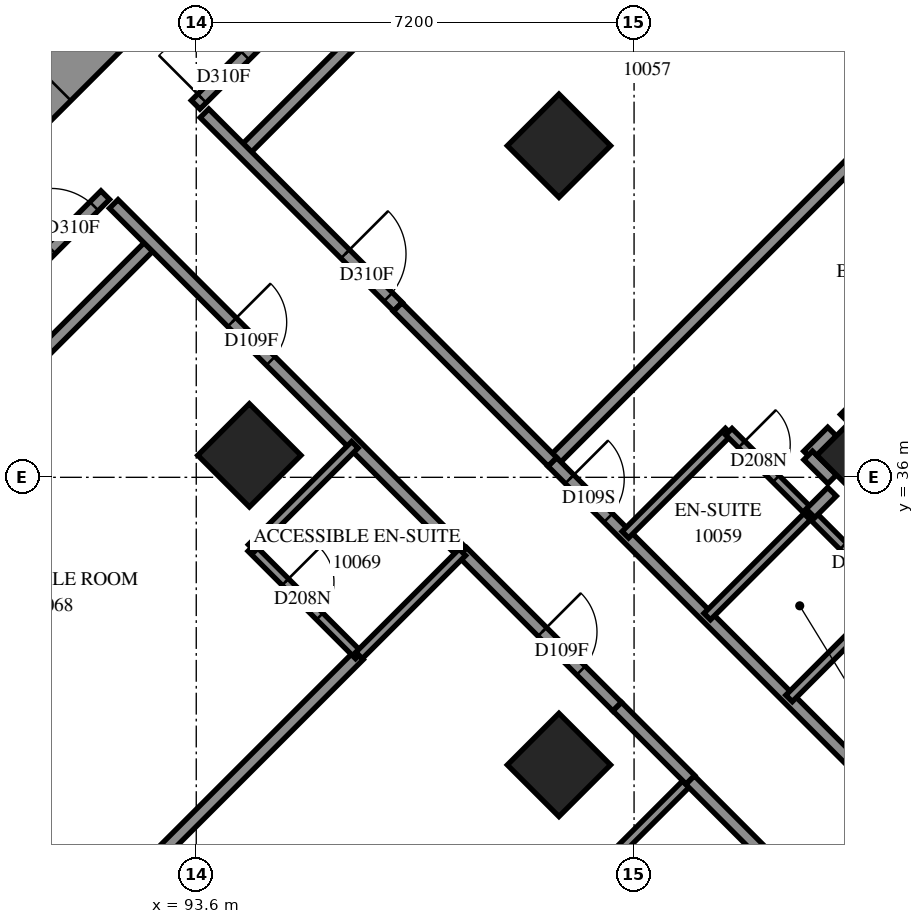
"""IFC4 building model, lengths in metres.
Left out: names, types, materials, properties, quantities, classifications, styles, units other than length and angle.
Written with IfcOpenShell. Run it as: python <this file> out.ifc"""

import sys

from ifc_helpers import new_model, si_unit, direction, frame, frame_2d, origin, origin_2d, place, context, subcontext, project, spatial, polyline, rectangle, outline, extrude, element, fill, save


model = new_model("IFC4")
c1 = context("Model", 3, precision=1e-05, world=origin(), true_north=direction((0.0, 1.0)))
c2 = subcontext(c1, "Body", "Model", "MODEL_VIEW")
j1 = project(units=[si_unit("LENGTHUNIT", "METRE"), si_unit("PLANEANGLEUNIT", "RADIAN")], contexts=[c1])
p1 = place(None, origin())
s1 = spatial("IfcSite", under=j1, at=p1, CompositionType="ELEMENT")
p2 = place(p1, origin())
s2 = spatial("IfcBuilding", under=s1, at=p2, CompositionType="ELEMENT")
p3 = place(p2, frame((0.0, 0.0, 40.6)))
s3 = spatial("IfcBuildingStorey", under=s2, at=p3, CompositionType="ELEMENT", Elevation=40.6)
for number, where, z_axis, x_axis in (
    (1, (99.565, 41.453, 0.0), (0.0, 0.0, 1.0), (0.707, -0.707, 0.0)),
    (2, (94.474, 36.362, 0.0), (0.0, 0.0, 1.0), (0.707, -0.707, 0.0)),
    (3, (104.656, 36.362, 0.0), (0.0, 0.0, 1.0), (0.707, -0.707, 0.0)),
    (4, (99.565, 31.271, 0.0), (0.0, 0.0, 1.0), (0.707, -0.707, 0.0)),
):
    element("IfcColumn", number, at=place(p3, frame(where, z_axis=z_axis, x_axis=x_axis)), inside=s3, PredefinedType="COLUMN", context=c2, shape_type="SweptSolid", body=[
        extrude(rectangle(XDim=1.2, YDim=1.2, at=origin_2d()), origin(), (0.0, 0.0, 1.0), 3.1),
    ])
p4 = place(p3, frame((87.19, 38.554, -0.3), z_axis=(0.0, 0.0, 1.0), x_axis=(0.707103309, 0.7071102534, 0.0)))
e5 = element("IfcWall", 5, at=p4, inside=s3, PredefinedType="SHEAR", context=c2, shape_type="SweptSolid", body=[
    extrude(rectangle(XDim=14.4, YDim=1.0, at=frame_2d((7.2, 0.0))), origin(), (0.0, 0.0, 1.0), 2.7),
])
p5 = place(p4, frame((4.55, 0.0, 0.3)))
e6 = element("IfcOpeningElement", 6, at=p5, cuts=e5, PredefinedType="OPENING", context=c2, shape_type="SweptSolid", body=[
    extrude(rectangle(XDim=1.1, YDim=2.1, at=frame_2d((0.55, 1.05))), frame((0.0, 0.51, 0.0), z_axis=(0.0, -1.0, 0.0), x_axis=(1.0, 0.0, 0.0)), (0.0, 0.0, 1.0), 1.02),
])
p6 = place(p4, frame((11.35, 0.0, 0.3)))
e7 = element("IfcOpeningElement", 7, at=p6, cuts=e5, PredefinedType="OPENING", context=c2, shape_type="SweptSolid", body=[
    extrude(rectangle(XDim=1.1, YDim=2.1, at=frame_2d((0.55, 1.05))), frame((0.0, 0.51, 0.0), z_axis=(0.0, -1.0, 0.0), x_axis=(1.0, 0.0, 0.0)), (0.0, 0.0, 1.0), 1.02),
])
p7 = place(p3, frame((88.113, 30.639, 0.0), z_axis=(0.0, 0.0, 1.0), x_axis=(0.7793447186, -0.6265954114, 0.0)))
e8 = element("IfcWall", 8, at=p7, inside=s3, PredefinedType="SOLIDWALL", context=c2, shape_type="SweptSolid", body=[
    extrude(outline(polyline([(-0.03, -0.275), (3.868, -0.275), (3.928, 0.275), (0.03, 0.275), (-0.03, -0.275)])), origin(), (0.0, 0.0, 1.0), 3.1),
])
p8 = place(p7, frame((0.675, 0.0, 0.5)))
e9 = element("IfcOpeningElement", 9, at=p8, cuts=e8, PredefinedType="OPENING", context=c2, shape_type="SweptSolid", body=[
    extrude(rectangle(XDim=2.8, YDim=2.45, at=frame_2d((1.4, 1.225))), frame((0.0, 0.285, 0.0), z_axis=(0.0, -1.0, 0.0), x_axis=(1.0, 0.0, 0.0)), (0.0, 0.0, 1.0), 0.57),
])
p9 = place(p3, frame((99.459, 36.255, 0.0), z_axis=(0.0, 0.0, 1.0), x_axis=(0.7071905616, 0.7070229908, 0.0)))
e10 = element("IfcWall", 10, at=p9, inside=s3, PredefinedType="PARTITIONING", context=c2, shape_type="SweptSolid", body=[
    extrude(rectangle(XDim=11.935, YDim=0.2, at=frame_2d((5.968, 0.0))), origin(), (0.0, 0.0, 1.0), 3.1),
])
p10 = place(p3, frame((94.367, 41.349, 0.0), z_axis=(0.0, 0.0, 1.0), x_axis=(0.7071109856, 0.7071025768, 0.0)))
e11 = element("IfcWall", 11, at=p10, inside=s3, PredefinedType="PARTITIONING", context=c2, shape_type="SweptSolid", body=[
    extrude(rectangle(XDim=11.892, YDim=0.2, at=frame_2d((5.946, 0.0))), origin(), (0.0, 0.0, 1.0), 3.1),
])
p11 = place(p3, frame((93.59, 42.126, 0.0), z_axis=(0.0, 0.0, 1.0), x_axis=(0.7071067812, 0.7071067812, 0.0)))
e12 = element("IfcWall", 12, at=p11, inside=s3, PredefinedType="PARTITIONING", context=c2, shape_type="SweptSolid", body=[
    extrude(rectangle(XDim=9.849, YDim=0.2, at=frame_2d((4.924, 0.0))), origin(), (0.0, 0.0, 1.0), 3.1),
])
p12 = place(p11, frame((0.148, 0.0, 0.0)))
e13 = element("IfcOpeningElement", 13, at=p12, cuts=e12, PredefinedType="OPENING", context=c2, shape_type="SweptSolid", body=[
    extrude(rectangle(XDim=1.0, YDim=2.1, at=frame_2d((0.5, 1.05))), frame((0.0, 0.11, 0.0), z_axis=(0.0, -1.0, 0.0), x_axis=(1.0, 0.0, 0.0)), (0.0, 0.0, 1.0), 0.22),
])
p13 = place(p3, frame((86.327, 33.299, 0.0), z_axis=(0.0, 0.0, 1.0), x_axis=(0.7069989659, 0.7072145801, 0.0)))
e14 = element("IfcWall", 14, at=p13, inside=s3, PredefinedType="PARTITIONING", context=c2, shape_type="SweptSolid", body=[
    extrude(rectangle(XDim=9.276, YDim=0.2, at=frame_2d((4.638, 0.0))), origin(), (0.0, 0.0, 1.0), 3.1),
])
p14 = place(p3, frame((92.243, 40.495, 0.0), z_axis=(0.0, 0.0, 1.0), x_axis=(0.7071067812, -0.7071067812, 0.0)))
e15 = element("IfcWall", 15, at=p14, inside=s3, PredefinedType="PARTITIONING", context=c2, shape_type="SweptSolid", body=[
    extrude(rectangle(XDim=8.101, YDim=0.2, at=frame_2d((4.05, 0.0))), origin(), (0.0, 0.0, 1.0), 3.1),
])
p15 = place(p14, frame((2.75, 0.0, 0.0)))
e16 = element("IfcOpeningElement", 16, at=p15, cuts=e15, PredefinedType="OPENING", context=c2, shape_type="SweptSolid", body=[
    extrude(rectangle(XDim=0.9, YDim=2.1, at=frame_2d((0.45, 1.05))), frame((0.0, 0.11, 0.0), z_axis=(0.0, -1.0, 0.0), x_axis=(1.0, 0.0, 0.0)), (0.0, 0.0, 1.0), 0.22),
])
p16 = place(p3, frame((86.836, 35.372, 0.0), z_axis=(0.0, 0.0, 1.0), x_axis=(0.7071067812, 0.7071067812, 0.0)))
e17 = element("IfcWall", 17, at=p16, inside=s3, PredefinedType="PARTITIONING", context=c2, shape_type="SweptSolid", body=[
    extrude(rectangle(XDim=7.45, YDim=0.2, at=frame_2d((3.725, 0.0))), origin(), (0.0, 0.0, 1.0), 3.1),
])
p17 = place(p16, frame((6.192, 0.0, 0.0)))
e18 = element("IfcOpeningElement", 18, at=p17, cuts=e17, PredefinedType="OPENING", context=c2, shape_type="SweptSolid", body=[
    extrude(rectangle(XDim=1.0, YDim=2.1, at=frame_2d((0.5, 1.05))), frame((0.0, 0.11, 0.0), z_axis=(0.0, -1.0, 0.0), x_axis=(1.0, 0.0, 0.0)), (0.0, 0.0, 1.0), 0.22),
])
p18 = place(p3, frame((99.455, 36.253, 0.0), z_axis=(0.0, 0.0, 1.0), x_axis=(0.7071067812, -0.7071067812, 0.0)))
e19 = element("IfcWall", 19, at=p18, inside=s3, PredefinedType="PARTITIONING", context=c2, shape_type="SweptSolid", body=[
    extrude(rectangle(XDim=7.201, YDim=0.2, at=frame_2d((3.601, 0.0))), origin(), (0.0, 0.0, 1.0), 3.1),
])
p19 = place(p18, frame((0.401, 0.0, 0.0)))
e20 = element("IfcOpeningElement", 20, at=p19, cuts=e19, PredefinedType="OPENING", context=c2, shape_type="SweptSolid", body=[
    extrude(rectangle(XDim=0.9, YDim=2.1, at=frame_2d((0.45, 1.05))), frame((0.0, 0.11, 0.0), z_axis=(0.0, -1.0, 0.0), x_axis=(1.0, 0.0, 0.0)), (0.0, 0.0, 1.0), 0.22),
])
p20 = place(p3, frame((91.456, 28.255, 0.0), z_axis=(0.0, 0.0, 1.0), x_axis=(0.7071067812, 0.7071067812, 0.0)))
e21 = element("IfcWall", 21, at=p20, inside=s3, PredefinedType="PARTITIONING", context=c2, shape_type="SweptSolid", body=[
    extrude(rectangle(XDim=6.815, YDim=0.2, at=frame_2d((3.408, 0.0))), origin(), (0.0, 0.0, 1.0), 3.1),
])
p21 = place(p3, frame((93.735, 41.987, 0.0), z_axis=(0.0, 0.0, 1.0), x_axis=(0.7071067812, -0.7071067812, 0.0)))
e22 = element("IfcWall", 22, at=p21, inside=s3, PredefinedType="PARTITIONING", context=c2, shape_type="SweptSolid", body=[
    extrude(rectangle(XDim=4.5, YDim=0.2, at=frame_2d((2.25, 0.0))), origin(), (0.0, 0.0, 1.0), 3.1),
])
p22 = place(p21, frame((3.274, 0.0, 0.0)))
e23 = element("IfcOpeningElement", 23, at=p22, cuts=e22, PredefinedType="OPENING", context=c2, shape_type="SweptSolid", body=[
    extrude(rectangle(XDim=1.0, YDim=2.1, at=frame_2d((0.5, 1.05))), frame((0.0, 0.11, 0.0), z_axis=(0.0, -1.0, 0.0), x_axis=(1.0, 0.0, 0.0)), (0.0, 0.0, 1.0), 0.22),
])
p23 = place(p3, frame((96.913, 38.801, 0.0), z_axis=(0.0, 0.0, 1.0), x_axis=(0.7068288851, -0.7073845681, 0.0)))
e24 = element("IfcWall", 24, at=p23, inside=s3, PredefinedType="PARTITIONING", context=c2, shape_type="SweptSolid", body=[
    extrude(rectangle(XDim=3.599, YDim=0.2, at=frame_2d((1.8, 0.0))), origin(), (0.0, 0.0, 1.0), 3.1),
])
p24 = place(p3, frame((97.976, 34.772, 0.0), z_axis=(0.0, 0.0, 1.0), x_axis=(0.7073845681, -0.7068288851, 0.0)))
e25 = element("IfcWall", 25, at=p24, inside=s3, PredefinedType="PARTITIONING", context=c2, shape_type="SweptSolid", body=[
    extrude(rectangle(XDim=3.599, YDim=0.2, at=frame_2d((1.8, 0.0))), origin(), (0.0, 0.0, 1.0), 3.1),
])
p25 = place(p24, frame((1.858, 0.0, 0.0)))
e26 = element("IfcOpeningElement", 26, at=p25, cuts=e25, PredefinedType="OPENING", context=c2, shape_type="SweptSolid", body=[
    extrude(rectangle(XDim=0.9, YDim=2.1, at=frame_2d((0.45, 1.05))), frame((0.0, 0.11, 0.0), z_axis=(0.0, -1.0, 0.0), x_axis=(1.0, 0.0, 0.0)), (0.0, 0.0, 1.0), 0.22),
])
p26 = place(p3, frame((94.505, 34.839, 0.0), z_axis=(0.0, 0.0, 1.0), x_axis=(0.7071067812, -0.7071067812, 0.0)))
e27 = element("IfcWall", 27, at=p26, inside=s3, PredefinedType="PARTITIONING", context=c2, shape_type="SweptSolid", body=[
    extrude(rectangle(XDim=2.5, YDim=0.15, at=frame_2d((1.25, 0.0))), origin(), (0.0, 0.0, 1.0), 3.1),
])
p27 = place(p26, frame((0.792, 0.0, 0.0)))
e28 = element("IfcOpeningElement", 28, at=p27, cuts=e27, PredefinedType="OPENING", context=c2, shape_type="SweptSolid", body=[
    extrude(rectangle(XDim=0.8, YDim=2.1, at=frame_2d((0.4, 1.05))), frame((0.0, 0.085, 0.0), z_axis=(0.0, -1.0, 0.0), x_axis=(1.0, 0.0, 0.0)), (0.0, 0.0, 1.0), 0.17),
])
for number, where, z_axis, x_axis in (
    (29, (102.003, 33.711, 0.0), (0.0, 0.0, 1.0), (0.707, 0.707, 0.0)),
    (30, (100.023, 29.327, 0.0), (0.0, 0.0, 1.0), (0.707, 0.707, 0.0)),
):
    element("IfcWall", number, at=place(p3, frame(where, z_axis=z_axis, x_axis=x_axis)), inside=s3, PredefinedType="PARTITIONING", context=c2, shape_type="SweptSolid", body=[
        extrude(rectangle(XDim=2.401, YDim=0.15, at=frame_2d((1.201, 0.0))), origin(), (0.0, 0.0, 1.0), 3.1),
    ])
for number, where, z_axis, x_axis in (
    (31, (96.278, 33.072, 0.0), (0.0, 0.0, 1.0), (0.708, 0.707, 0.0)),
    (32, (94.511, 34.839, 0.0), (0.0, 0.0, 1.0), (0.708, 0.707, 0.0)),
    (33, (100.657, 35.057, 0.0), (0.0, 0.0, 1.0), (0.708, 0.707, 0.0)),
    (34, (103.349, 32.365, 0.0), (0.0, 0.0, 1.0), (0.707, 0.708, 0.0)),
):
    element("IfcWall", number, at=place(p3, frame(where, z_axis=z_axis, x_axis=x_axis)), inside=s3, PredefinedType="PARTITIONING", context=c2, shape_type="SweptSolid", body=[
        extrude(rectangle(XDim=2.4, YDim=0.15, at=frame_2d((1.2, 0.0))), origin(), (0.0, 0.0, 1.0), 3.1),
    ])
p28 = place(p3, frame((103.701, 35.407, 0.0), z_axis=(0.0, 0.0, 1.0), x_axis=(0.7065800724, -0.7076330979, 0.0)))
e35 = element("IfcWall", 35, at=p28, inside=s3, PredefinedType="PARTITIONING", context=c2, shape_type="SweptSolid", body=[
    extrude(rectangle(XDim=1.899, YDim=0.15, at=frame_2d((0.95, 0.0))), origin(), (0.0, 0.0, 1.0), 3.1),
])
p29 = place(p28, frame((0.759, 0.0, 0.0)))
e36 = element("IfcOpeningElement", 36, at=p29, cuts=e35, PredefinedType="OPENING", context=c2, shape_type="SweptSolid", body=[
    extrude(rectangle(XDim=0.8, YDim=2.1, at=frame_2d((0.4, 1.05))), frame((0.0, 0.085, 0.0), z_axis=(0.0, -1.0, 0.0), x_axis=(1.0, 0.0, 0.0)), (0.0, 0.0, 1.0), 0.17),
])
p30 = place(p3, frame((101.72, 31.022, 0.0), z_axis=(0.0, 0.0, 1.0), x_axis=(0.7065800724, -0.7076330979, 0.0)))
e37 = element("IfcWall", 37, at=p30, inside=s3, PredefinedType="PARTITIONING", context=c2, shape_type="SweptSolid", body=[
    extrude(rectangle(XDim=1.899, YDim=0.2, at=frame_2d((0.95, 0.0))), origin(), (0.0, 0.0, 1.0), 3.1),
])
p31 = place(p3, frame((102.358, 36.75, 0.0), z_axis=(0.0, 0.0, 1.0), x_axis=(0.7076330979, -0.7065800724, 0.0)))
e38 = element("IfcWall", 38, at=p31, inside=s3, PredefinedType="PARTITIONING", context=c2, shape_type="SweptSolid", body=[
    extrude(rectangle(XDim=1.899, YDim=0.15, at=frame_2d((0.95, 0.0))), origin(), (0.0, 0.0, 1.0), 3.1),
])
p32 = place(p31, frame((0.296, 0.0, 0.0)))
e39 = element("IfcOpeningElement", 39, at=p32, cuts=e38, PredefinedType="OPENING", context=c2, shape_type="SweptSolid", body=[
    extrude(rectangle(XDim=0.8, YDim=2.1, at=frame_2d((0.4, 1.05))), frame((0.0, 0.085, 0.0), z_axis=(0.0, -1.0, 0.0), x_axis=(1.0, 0.0, 0.0)), (0.0, 0.0, 1.0), 0.17),
])
p33 = place(p3, frame((100.523, 32.229, 0.0), z_axis=(0.0, 0.0, 1.0), x_axis=(0.7071067812, -0.7071067812, 0.0)))
e40 = element("IfcWall", 40, at=p33, inside=s3, PredefinedType="PARTITIONING", context=c2, shape_type="SweptSolid", body=[
    extrude(rectangle(XDim=1.7, YDim=0.2, at=frame_2d((0.85, 0.0))), origin(), (0.0, 0.0, 1.0), 3.1),
])
for number, where, z_axis, x_axis in (
    (41, (103.661, 36.359, 0.0), (0.0, 0.0, 1.0), (0.707, 0.707, 0.0)),
    (42, (104.265, 36.963, 0.0), (0.0, 0.0, 1.0), (0.707, 0.707, 0.0)),
):
    element("IfcWall", number, at=place(p3, frame(where, z_axis=z_axis, x_axis=x_axis)), inside=s3, PredefinedType="PARTITIONING", context=c2, shape_type="SweptSolid", body=[
        extrude(rectangle(XDim=0.557, YDim=0.2, at=frame_2d((0.279, 0.0))), origin(), (0.0, 0.0, 1.0), 3.1),
    ])
p34 = place(p3, frame((103.664, 36.36, 0.0), z_axis=(0.0, 0.0, 1.0), x_axis=(0.7089037401, -0.705305244, 0.0)))
e43 = element("IfcWall", 43, at=p34, inside=s3, PredefinedType="PARTITIONING", context=c2, shape_type="SweptSolid", body=[
    extrude(rectangle(XDim=0.556, YDim=0.2, at=frame_2d((0.278, 0.0))), origin(), (0.0, 0.0, 1.0), 3.1),
])
p35 = place(p3, frame((103.701, 35.409, 0.0), z_axis=(0.0, 0.0, 1.0), x_axis=(0.7071067812, 0.7071067812, 0.0)))
e44 = element("IfcWall", 44, at=p35, inside=s3, PredefinedType="PARTITIONING", context=c2, shape_type="SweptSolid", body=[
    extrude(rectangle(XDim=0.501, YDim=0.2, at=frame_2d((0.25, 0.0))), origin(), (0.0, 0.0, 1.0), 3.1),
])
p36 = place(p12, origin())
e45 = element("IfcDoor", 45, at=p36, inside=s3, OperationType="SINGLE_SWING_LEFT", PredefinedType="DOOR", context=c2, shape_type="SweptSolid", body=[
    extrude(rectangle(XDim=1.0, YDim=2.1, at=frame_2d((0.5, 1.05))), frame((0.0, 0.025, 0.0), z_axis=(0.0, -1.0, 0.0), x_axis=(1.0, 0.0, 0.0)), (0.0, 0.0, 1.0), 0.05),
])
fill(e13, e45)
p37 = place(p22, origin())
e46 = element("IfcDoor", 46, at=p37, inside=s3, OperationType="SINGLE_SWING_RIGHT", PredefinedType="DOOR", context=c2, shape_type="SweptSolid", body=[
    extrude(rectangle(XDim=1.0, YDim=2.1, at=frame_2d((0.5, 1.05))), frame((0.0, 0.025, 0.0), z_axis=(0.0, -1.0, 0.0), x_axis=(1.0, 0.0, 0.0)), (0.0, 0.0, 1.0), 0.05),
])
fill(e23, e46)
p38 = place(p19, origin())
e47 = element("IfcDoor", 47, at=p38, inside=s3, OperationType="SINGLE_SWING_RIGHT", PredefinedType="DOOR", context=c2, shape_type="SweptSolid", body=[
    extrude(rectangle(XDim=0.9, YDim=2.1, at=frame_2d((0.45, 1.05))), frame((0.0, 0.025, 0.0), z_axis=(0.0, -1.0, 0.0), x_axis=(1.0, 0.0, 0.0)), (0.0, 0.0, 1.0), 0.05),
])
fill(e20, e47)
p39 = place(p32, origin())
e48 = element("IfcDoor", 48, at=p39, inside=s3, OperationType="SINGLE_SWING_RIGHT", PredefinedType="DOOR", context=c2, shape_type="SweptSolid", body=[
    extrude(rectangle(XDim=0.8, YDim=2.1, at=frame_2d((0.4, 1.05))), frame((0.0, 0.025, 0.0), z_axis=(0.0, -1.0, 0.0), x_axis=(1.0, 0.0, 0.0)), (0.0, 0.0, 1.0), 0.05),
])
fill(e39, e48)
p40 = place(p29, origin())
e49 = element("IfcDoor", 49, at=p40, inside=s3, OperationType="SINGLE_SWING_RIGHT", PredefinedType="DOOR", context=c2, shape_type="SweptSolid", body=[
    extrude(rectangle(XDim=0.8, YDim=2.1, at=frame_2d((0.4, 1.05))), frame((0.0, 0.025, 0.0), z_axis=(0.0, -1.0, 0.0), x_axis=(1.0, 0.0, 0.0)), (0.0, 0.0, 1.0), 0.05),
])
fill(e36, e49)
p41 = place(p17, origin())
e50 = element("IfcDoor", 50, at=p41, inside=s3, OperationType="SINGLE_SWING_RIGHT", PredefinedType="DOOR", context=c2, shape_type="SweptSolid", body=[
    extrude(rectangle(XDim=1.0, YDim=2.1, at=frame_2d((0.5, 1.05))), frame((0.0, 0.025, 0.0), z_axis=(0.0, -1.0, 0.0), x_axis=(1.0, 0.0, 0.0)), (0.0, 0.0, 1.0), 0.05),
])
fill(e18, e50)
p42 = place(p15, origin())
e51 = element("IfcDoor", 51, at=p42, inside=s3, OperationType="SINGLE_SWING_LEFT", PredefinedType="DOOR", context=c2, shape_type="SweptSolid", body=[
    extrude(rectangle(XDim=0.9, YDim=2.1, at=frame_2d((0.45, 1.05))), frame((0.0, 0.025, 0.0), z_axis=(0.0, -1.0, 0.0), x_axis=(1.0, 0.0, 0.0)), (0.0, 0.0, 1.0), 0.05),
])
fill(e16, e51)
p43 = place(p27, origin())
e52 = element("IfcDoor", 52, at=p43, inside=s3, OperationType="SINGLE_SWING_RIGHT", PredefinedType="DOOR", context=c2, shape_type="SweptSolid", body=[
    extrude(rectangle(XDim=0.8, YDim=2.1, at=frame_2d((0.4, 1.05))), frame((0.0, 0.025, 0.0), z_axis=(0.0, -1.0, 0.0), x_axis=(1.0, 0.0, 0.0)), (0.0, 0.0, 1.0), 0.05),
])
fill(e28, e52)
p44 = place(p25, origin())
e53 = element("IfcDoor", 53, at=p44, inside=s3, OperationType="SINGLE_SWING_LEFT", PredefinedType="DOOR", context=c2, shape_type="SweptSolid", body=[
    extrude(rectangle(XDim=0.9, YDim=2.1, at=frame_2d((0.45, 1.05))), frame((0.0, 0.025, 0.0), z_axis=(0.0, -1.0, 0.0), x_axis=(1.0, 0.0, 0.0)), (0.0, 0.0, 1.0), 0.05),
])
fill(e26, e53)
save(model, sys.argv[1])
